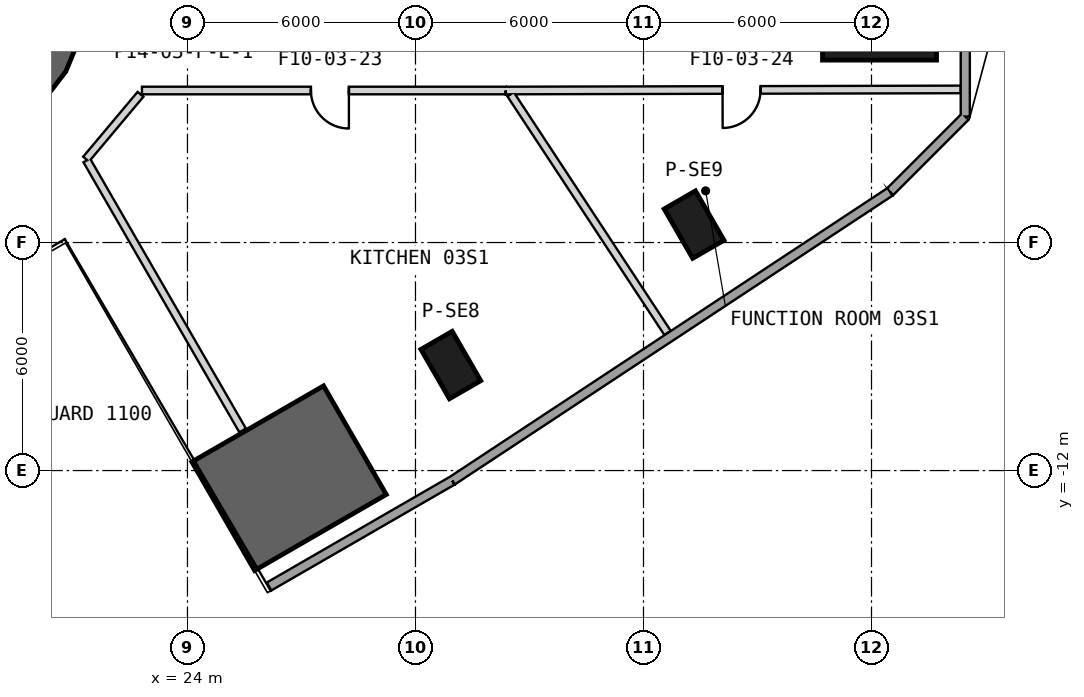
"""IFC4 building model, lengths in metres.
Left out: names, types, materials, properties, quantities, classifications, styles, units other than length and angle.
Written with IfcOpenShell. Run it as: python <this file> out.ifc"""

import sys

from ifc_helpers import new_model, si_unit, direction, frame, frame_2d, origin, origin_2d, place, context, subcontext, project, spatial, polyline, rectangle, outline, extrude, element, fill, save


model = new_model("IFC4")
c1 = context("Model", 3, precision=1e-05, world=origin(), true_north=direction((0.0, 1.0)))
c2 = subcontext(c1, "Body", "Model", "MODEL_VIEW")
j1 = project(units=[si_unit("LENGTHUNIT", "METRE"), si_unit("PLANEANGLEUNIT", "RADIAN")], contexts=[c1])
p1 = place(None, origin())
s1 = spatial("IfcSite", under=j1, at=p1, CompositionType="ELEMENT")
p2 = place(p1, origin())
s2 = spatial("IfcBuilding", under=s1, at=p2, CompositionType="ELEMENT")
p3 = place(p2, frame((0.0, 0.0, 21.5)))
s3 = spatial("IfcBuildingStorey", under=s2, at=p3, CompositionType="ELEMENT", Elevation=21.5)
p4 = place(p3, frame((42.211, 0.0, 0.0), z_axis=(0.0, 0.0, 1.0), x_axis=(1.0, 0.0, 0.0)))
e1 = element("IfcColumn", 1, at=p4, inside=s3, PredefinedType="COLUMN", context=c2, shape_type="SweptSolid", body=[
    extrude(rectangle(XDim=3.0, YDim=2.4, at=origin_2d()), origin(), (0.0, 0.0, 1.0), 6.0),
])
for number, where, z_axis, x_axis in (
    (2, (30.93, -9.224, 0.0), (0.0, 0.0, 1.0), (0.5, -0.866, 0.0)),
    (3, (37.331, -5.528, 0.0), (0.0, 0.0, 1.0), (0.5, -0.866, 0.0)),
):
    element("IfcColumn", number, at=place(p3, frame(where, z_axis=z_axis, x_axis=x_axis)), inside=s3, PredefinedType="COLUMN", context=c2, shape_type="SweptSolid", body=[
        extrude(rectangle(XDim=1.5, YDim=0.95, at=origin_2d()), origin(), (0.0, 0.0, 1.0), 6.0),
    ])
p5 = place(p3, origin())
e4 = element("IfcWall", 4, at=p5, inside=s3, PredefinedType="SHEAR", context=c2, shape_type="SweptSolid", body=[
    extrude(outline(polyline([(19.7, -2.598), (20.321, -2.121), (20.798, -1.5), (21.098, -0.777), (21.2, 0.0), (21.098, 0.777), (20.798, 1.5), (20.321, 2.121), (19.7, 2.598), (19.25, 1.819), (19.685, 1.485), (20.019, 1.05), (20.229, 0.543), (20.3, 0.0), (20.229, -0.543), (20.019, -1.05), (19.685, -1.485), (19.25, -1.819), (19.7, -2.598)])), origin(), (0.0, 0.0, 1.0), 6.0),
])
p6 = place(p3, origin())
e5 = element("IfcWall", 5, at=p6, inside=s3, PredefinedType="SHEAR", context=c2, shape_type="SweptSolid", body=[
    extrude(outline(polyline([(25.767, -14.63), (29.231, -12.63), (27.581, -9.772), (24.117, -11.772), (25.767, -14.63)])), origin(), (0.0, 0.0, 1.0), 6.0),
])
p7 = place(p3, frame((26.147, -15.05, 0.0), z_axis=(0.0, 0.0, 1.0), x_axis=(0.865999312459, 0.500045188778, 0.0)))
e6 = element("IfcWall", 6, at=p7, inside=s3, PredefinedType="SOLIDWALL", context=c2, shape_type="SweptSolid", body=[
    extrude(rectangle(XDim=5.566, YDim=0.24, at=frame_2d((2.783, 0.0))), origin(), (0.0, 0.0, 1.0), 5.7),
])
p8 = place(p3, frame((30.968, -12.267, 0.0), z_axis=(0.0, 0.0, 1.0), x_axis=(0.834683405501, 0.550730072342, 0.0)))
e7 = element("IfcWall", 7, at=p8, inside=s3, PredefinedType="SOLIDWALL", context=c2, shape_type="SweptSolid", body=[
    extrude(rectangle(XDim=13.801, YDim=0.24, at=frame_2d((6.901, 0.0))), origin(), (0.0, 0.0, 1.0), 5.7),
])
p9 = place(p3, frame((42.487, -4.666, 0.0), z_axis=(0.0, 0.0, 1.0), x_axis=(0.707106781187, 0.707106781187, 0.0)))
e8 = element("IfcWall", 8, at=p9, inside=s3, PredefinedType="SOLIDWALL", context=c2, shape_type="SweptSolid", body=[
    extrude(rectangle(XDim=2.801, YDim=0.24, at=frame_2d((1.4, 0.0))), origin(), (0.0, 0.0, 1.0), 5.7),
])
p10 = place(p3, frame((44.468, -2.686, 0.0), z_axis=(0.0, 0.0, 1.0), x_axis=(0.0, 1.0, 0.0)))
e9 = element("IfcWall", 9, at=p10, inside=s3, PredefinedType="SOLIDWALL", context=c2, shape_type="SweptSolid", body=[
    extrude(rectangle(XDim=5.371, YDim=0.24, at=frame_2d((2.686, 0.0))), origin(), (0.0, 0.0, 1.0), 5.7),
])
p11 = place(p3, frame((32.375, -2.0, 0.0), z_axis=(0.0, 0.0, 1.0), x_axis=(-1.0, 0.0, 0.0)))
e10 = element("IfcWall", 10, at=p11, inside=s3, PredefinedType="PARTITIONING", context=c2, shape_type="SweptSolid", body=[
    extrude(rectangle(XDim=9.573, YDim=0.2, at=frame_2d((4.786, 0.0))), origin(), (0.0, 0.0, 1.0), 5.7),
])
p12 = place(p11, frame((4.127, 0.0, 0.0)))
e11 = element("IfcOpeningElement", 11, at=p12, cuts=e10, PredefinedType="OPENING", context=c2, shape_type="SweptSolid", body=[
    extrude(rectangle(XDim=1.0, YDim=2.1, at=frame_2d((0.5, 1.05))), frame((0.0, 0.11, 0.0), z_axis=(0.0, -1.0, 0.0), x_axis=(1.0, 0.0, 0.0)), (0.0, 0.0, 1.0), 0.22),
])
p13 = place(p3, frame((21.332, -3.807, 0.0), z_axis=(0.0, 0.0, 1.0), x_axis=(0.642927476008, 0.765927059578, 0.0)))
e12 = element("IfcWall", 12, at=p13, inside=s3, PredefinedType="PARTITIONING", context=c2, shape_type="SweptSolid", body=[
    extrude(rectangle(XDim=2.229, YDim=0.2, at=frame_2d((1.115, 0.0))), origin(), (0.0, 0.0, 1.0), 4.78),
])
p14 = place(p3, frame((25.452, -10.944, 0.0), z_axis=(0.0, 0.0, 1.0), x_axis=(-0.499992958048, 0.866029469419, 0.0)))
e13 = element("IfcWall", 13, at=p14, inside=s3, PredefinedType="PARTITIONING", context=c2, shape_type="SweptSolid", body=[
    extrude(rectangle(XDim=8.203, YDim=0.2, at=frame_2d((4.102, 0.0))), origin(), (0.0, 0.0, 1.0), 5.07),
])
p15 = place(p3, frame((44.347, -1.971, 0.0), z_axis=(0.0, 0.0, 1.0), x_axis=(-0.999997105116, -0.002406192056, 0.0)))
e14 = element("IfcWall", 14, at=p15, inside=s3, PredefinedType="PARTITIONING", context=c2, shape_type="SweptSolid", body=[
    extrude(rectangle(XDim=11.973, YDim=0.2, at=frame_2d((5.986, 0.0))), origin(), (0.0, 0.0, 1.0), 5.7),
])
p16 = place(p15, frame((5.267, 0.0, 0.0)))
e15 = element("IfcOpeningElement", 15, at=p16, cuts=e14, PredefinedType="OPENING", context=c2, shape_type="SweptSolid", body=[
    extrude(rectangle(XDim=1.0, YDim=2.1, at=frame_2d((0.5, 1.05))), frame((0.0, 0.11, 0.0), z_axis=(0.0, -1.0, 0.0), x_axis=(1.0, 0.0, 0.0)), (0.0, 0.0, 1.0), 0.22),
])
p17 = place(p3, frame((36.634, -8.378, 0.0), z_axis=(0.0, 0.0, 1.0), x_axis=(-0.549584280898, 0.835438279102, 0.0)))
e16 = element("IfcWall", 16, at=p17, inside=s3, PredefinedType="PARTITIONING", context=c2, shape_type="SweptSolid", body=[
    extrude(rectangle(XDim=7.515, YDim=0.2, at=frame_2d((3.757, 0.0))), origin(), (0.0, 0.0, 1.0), 4.78),
])
p18 = place(p12, origin())
e17 = element("IfcDoor", 17, at=p18, inside=s3, OperationType="SINGLE_SWING_LEFT", PredefinedType="USERDEFINED", context=c2, shape_type="SweptSolid", body=[
    extrude(rectangle(XDim=1.0, YDim=2.1, at=frame_2d((0.5, 1.05))), frame((0.0, 0.025, 0.0), z_axis=(0.0, -1.0, 0.0), x_axis=(1.0, 0.0, 0.0)), (0.0, 0.0, 1.0), 0.05),
])
fill(e11, e17)
p19 = place(p16, origin())
e18 = element("IfcDoor", 18, at=p19, inside=s3, OperationType="SINGLE_SWING_RIGHT", PredefinedType="USERDEFINED", context=c2, shape_type="SweptSolid", body=[
    extrude(rectangle(XDim=1.0, YDim=2.1, at=frame_2d((0.5, 1.05))), frame((0.0, 0.025, 0.0), z_axis=(0.0, -1.0, 0.0), x_axis=(1.0, 0.0, 0.0)), (0.0, 0.0, 1.0), 0.05),
])
fill(e15, e18)
save(model, sys.argv[1])
